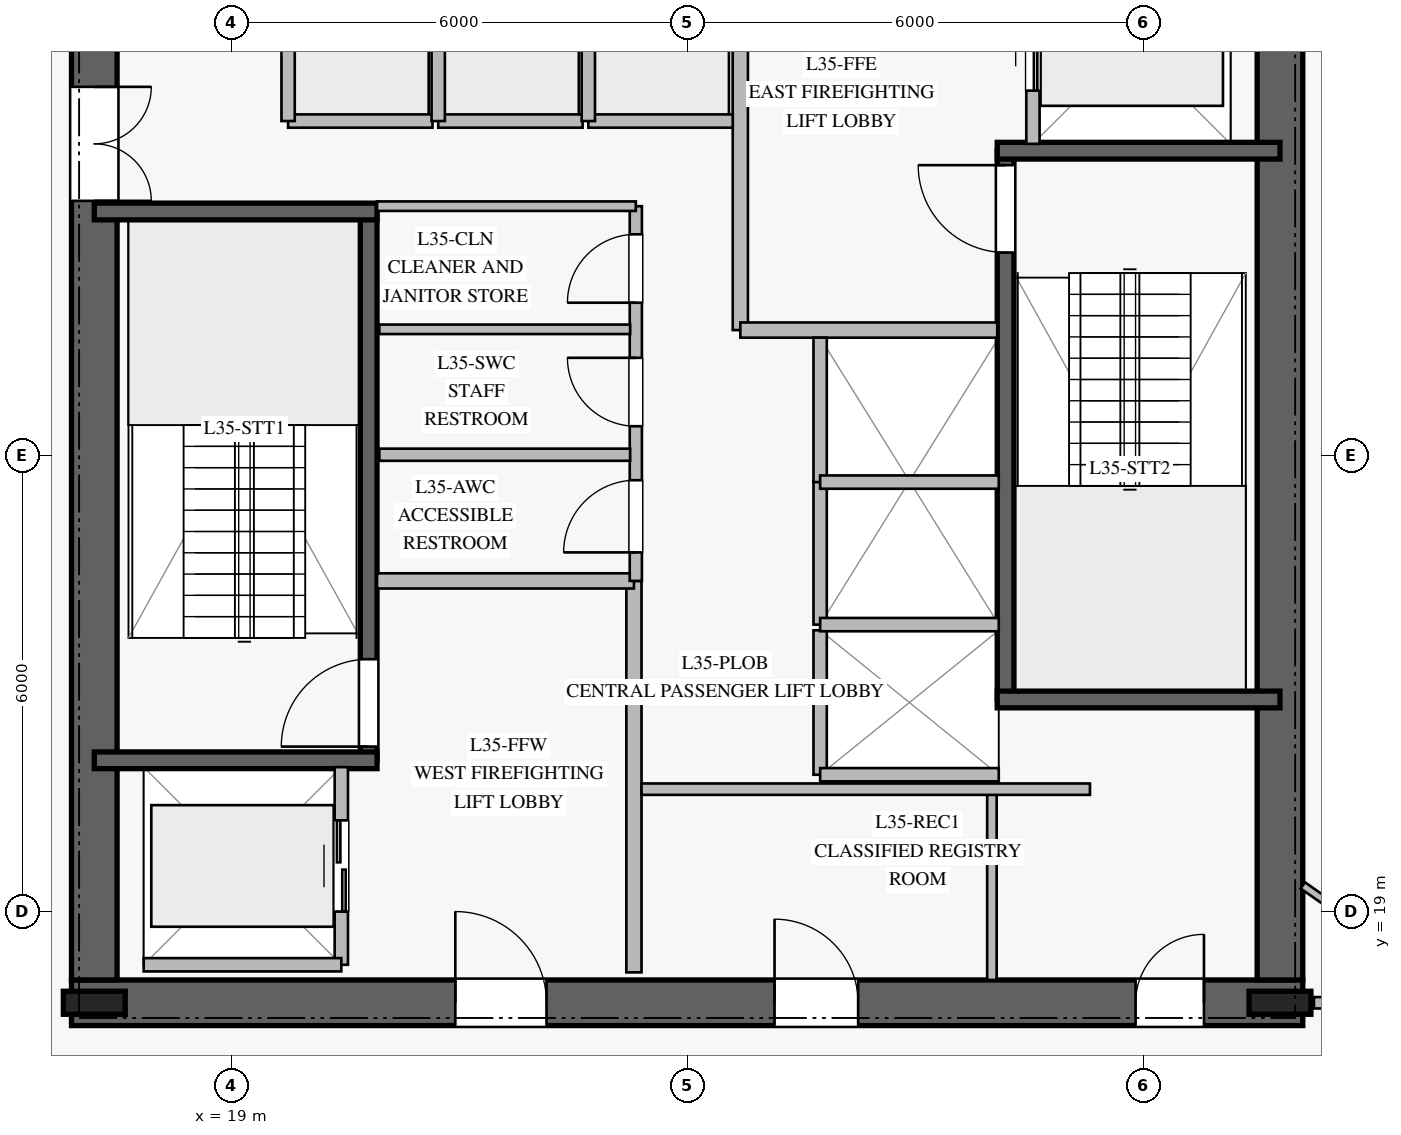
"""IFC4 building model, lengths in metres.
Left out: names, types, materials, properties, quantities, classifications, styles, units other than length and angle.
Written with IfcOpenShell. Run it as: python <this file> out.ifc"""

import sys

from ifc_helpers import new_model, si_unit, direction, frame, frame_2d, origin, origin_2d, place, context, subcontext, project, spatial, rectangle, i_section, extrude, element, fill, save


model = new_model("IFC4")
c1 = context("Model", 3, precision=1e-05, world=origin(), true_north=direction((0.0, 1.0)))
c2 = subcontext(c1, "Body", "Model", "MODEL_VIEW")
j1 = project(units=[si_unit("LENGTHUNIT", "METRE"), si_unit("PLANEANGLEUNIT", "RADIAN")], contexts=[c1])
p1 = place(None, origin())
s1 = spatial("IfcSite", under=j1, at=p1, CompositionType="ELEMENT")
p2 = place(p1, origin())
s2 = spatial("IfcBuilding", under=s1, at=p2, CompositionType="ELEMENT")
p3 = place(p2, frame((0.0, 0.0, 146.4)))
s3 = spatial("IfcBuildingStorey", under=s2, at=p3, CompositionType="ELEMENT", Elevation=146.4)
p4 = place(p3, frame((16.9, 17.8, 0.0), z_axis=(0.0, 0.0, 1.0), x_axis=(1.0, 0.0, 0.0)))
e1 = element("IfcWall", 1, at=p4, inside=s3, PredefinedType="SHEAR", context=c2, shape_type="SweptSolid", body=[
    extrude(rectangle(XDim=16.2, YDim=0.6, at=frame_2d((8.1, 0.0))), origin(), (0.0, 0.0, 1.0), 3.76),
])
p5 = place(p4, frame((5.05, 0.0, 0.0)))
e2 = element("IfcOpeningElement", 2, at=p5, cuts=e1, PredefinedType="OPENING", context=c2, shape_type="SweptSolid", body=[
    extrude(rectangle(XDim=1.2, YDim=2.25, at=frame_2d((0.6, 1.125))), frame((0.0, 0.31, 0.0), z_axis=(0.0, -1.0, 0.0), x_axis=(1.0, 0.0, 0.0)), (0.0, 0.0, 1.0), 0.62),
])
p6 = place(p4, frame((14.0, 0.0, 0.0)))
e3 = element("IfcOpeningElement", 3, at=p6, cuts=e1, PredefinedType="OPENING", context=c2, shape_type="SweptSolid", body=[
    extrude(rectangle(XDim=0.9, YDim=2.1, at=frame_2d((0.45, 1.05))), frame((0.0, 0.31, 0.0), z_axis=(0.0, -1.0, 0.0), x_axis=(1.0, 0.0, 0.0)), (0.0, 0.0, 1.0), 0.62),
])
p7 = place(p4, frame((9.25, 0.0, 0.0)))
e4 = element("IfcOpeningElement", 4, at=p7, cuts=e1, PredefinedType="OPENING", context=c2, shape_type="SweptSolid", body=[
    extrude(rectangle(XDim=1.1, YDim=2.2, at=frame_2d((0.55, 1.1))), frame((0.0, 0.31, 0.0), z_axis=(0.0, -1.0, 0.0), x_axis=(1.0, 0.0, 0.0)), (0.0, 0.0, 1.0), 0.62),
])
p8 = place(p3, frame((17.2, 31.9, 0.0), z_axis=(0.0, 0.0, 1.0), x_axis=(0.0, -1.0, 0.0)))
e5 = element("IfcWall", 5, at=p8, inside=s3, PredefinedType="SHEAR", context=c2, shape_type="SweptSolid", body=[
    extrude(rectangle(XDim=13.8, YDim=0.6, at=frame_2d((6.9, 0.0))), origin(), (0.0, 0.0, 1.0), 3.76),
])
p9 = place(p8, frame((2.05, 0.0, 0.0)))
e6 = element("IfcOpeningElement", 6, at=p9, cuts=e5, PredefinedType="OPENING", context=c2, shape_type="SweptSolid", body=[
    extrude(rectangle(XDim=1.5, YDim=2.2, at=frame_2d((0.75, 1.1))), frame((0.0, 0.31, 0.0), z_axis=(0.0, -1.0, 0.0), x_axis=(1.0, 0.0, 0.0)), (0.0, 0.0, 1.0), 0.62),
])
p10 = place(p3, frame((32.8, 18.1, 0.0), z_axis=(0.0, 0.0, 1.0), x_axis=(0.0, 1.0, 0.0)))
e7 = element("IfcWall", 7, at=p10, inside=s3, PredefinedType="SHEAR", context=c2, shape_type="SweptSolid", body=[
    extrude(rectangle(XDim=13.8, YDim=0.6, at=frame_2d((6.9, 0.0))), origin(), (0.0, 0.0, 1.0), 3.76),
])
for number, where, z_axis, x_axis in (
    (8, (17.2, 17.8, 0.0), (0.0, 0.0, 1.0), (1.0, 0.0, 0.0)),
    (9, (32.8, 17.8, 0.0), (0.0, 0.0, 1.0), (1.0, 0.0, 0.0)),
):
    element("IfcColumn", number, at=place(p3, frame(where, z_axis=z_axis, x_axis=x_axis)), inside=s3, PredefinedType="COLUMN", context=c2, shape_type="SweptSolid", body=[
        extrude(i_section(OverallWidth=0.303, OverallDepth=0.814, WebThickness=0.021, FlangeThickness=0.04, at=origin_2d()), origin(), (0.0, 0.0, 1.0), 4.0),
    ])
p11 = place(p3, frame((20.81, 20.99, 0.0), z_axis=(0.0, 0.0, 1.0), x_axis=(0.0, 1.0, 0.0)))
e10 = element("IfcWall", 10, at=p11, inside=s3, PredefinedType="SOLIDWALL", context=c2, shape_type="SweptSolid", body=[
    extrude(rectangle(XDim=7.22, YDim=0.22, at=frame_2d((3.61, 0.0))), origin(), (0.0, 0.0, 1.0), 3.76),
])
p12 = place(p11, frame((0.18, 0.0, 0.0)))
e11 = element("IfcOpeningElement", 11, at=p12, cuts=e10, PredefinedType="OPENING", context=c2, shape_type="SweptSolid", body=[
    extrude(rectangle(XDim=1.15, YDim=2.2, at=frame_2d((0.575, 1.1))), frame((0.0, 0.12, 0.0), z_axis=(0.0, -1.0, 0.0), x_axis=(1.0, 0.0, 0.0)), (0.0, 0.0, 1.0), 0.24),
])
for number, where, z_axis, x_axis in (
    (12, (17.2, 20.99, 0.0), (0.0, 0.0, 1.0), (1.0, 0.0, 0.0)),
    (13, (17.2, 28.21, 0.0), (0.0, 0.0, 1.0), (1.0, 0.0, 0.0)),
):
    element("IfcWall", number, at=place(p3, frame(where, z_axis=z_axis, x_axis=x_axis)), inside=s3, PredefinedType="SOLIDWALL", context=c2, shape_type="SweptSolid", body=[
        extrude(rectangle(XDim=3.72, YDim=0.22, at=frame_2d((1.86, 0.0))), origin(), (0.0, 0.0, 1.0), 3.76),
    ])
p13 = place(p3, frame((29.19, 21.79, 0.0), z_axis=(0.0, 0.0, 1.0), x_axis=(0.0, 1.0, 0.0)))
e14 = element("IfcWall", 14, at=p13, inside=s3, PredefinedType="SOLIDWALL", context=c2, shape_type="SweptSolid", body=[
    extrude(rectangle(XDim=7.22, YDim=0.22, at=frame_2d((3.61, 0.0))), origin(), (0.0, 0.0, 1.0), 3.76),
])
p14 = place(p13, frame((5.88, 0.0, 0.0)))
e15 = element("IfcOpeningElement", 15, at=p14, cuts=e14, PredefinedType="OPENING", context=c2, shape_type="SweptSolid", body=[
    extrude(rectangle(XDim=1.15, YDim=2.2, at=frame_2d((0.575, 1.1))), frame((0.0, 0.12, 0.0), z_axis=(0.0, -1.0, 0.0), x_axis=(1.0, 0.0, 0.0)), (0.0, 0.0, 1.0), 0.24),
])
for number, where, z_axis, x_axis in (
    (16, (29.08, 21.79, 0.0), (0.0, 0.0, 1.0), (1.0, 0.0, 0.0)),
    (17, (29.08, 29.01, 0.0), (0.0, 0.0, 1.0), (1.0, 0.0, 0.0)),
):
    element("IfcWall", number, at=place(p3, frame(where, z_axis=z_axis, x_axis=x_axis)), inside=s3, PredefinedType="SOLIDWALL", context=c2, shape_type="SweptSolid", body=[
        extrude(rectangle(XDim=3.72, YDim=0.22, at=frame_2d((1.86, 0.0))), origin(), (0.0, 0.0, 1.0), 3.76),
    ])
p15 = place(p3, frame((24.3, 18.2, 0.0), z_axis=(0.0, 0.0, 1.0), x_axis=(0.0, 1.0, 0.0)))
e18 = element("IfcWall", 18, at=p15, inside=s3, PredefinedType="PARTITIONING", context=c2, shape_type="SweptSolid", body=[
    extrude(rectangle(XDim=5.15, YDim=0.2, at=frame_2d((2.575, 0.0))), origin(), (0.0, 0.0, 1.0), 3.76),
])
p16 = place(p3, frame((20.92, 23.35, 0.0), z_axis=(0.0, 0.0, 1.0), x_axis=(1.0, 0.0, 0.0)))
e19 = element("IfcWall", 19, at=p16, inside=s3, PredefinedType="PARTITIONING", context=c2, shape_type="SweptSolid", body=[
    extrude(rectangle(XDim=3.38, YDim=0.2, at=frame_2d((1.69, 0.0))), origin(), (0.0, 0.0, 1.0), 3.76),
])
p17 = place(p3, frame((25.7, 26.65, 0.0), z_axis=(0.0, 0.0, 1.0), x_axis=(0.0, 1.0, 0.0)))
e20 = element("IfcWall", 20, at=p17, inside=s3, PredefinedType="PARTITIONING", context=c2, shape_type="SweptSolid", body=[
    extrude(rectangle(XDim=5.15, YDim=0.2, at=frame_2d((2.575, 0.0))), origin(), (0.0, 0.0, 1.0), 3.76),
])
p18 = place(p3, frame((25.7, 26.65, 0.0), z_axis=(0.0, 0.0, 1.0), x_axis=(1.0, 0.0, 0.0)))
e21 = element("IfcWall", 21, at=p18, inside=s3, PredefinedType="PARTITIONING", context=c2, shape_type="SweptSolid", body=[
    extrude(rectangle(XDim=3.38, YDim=0.2, at=frame_2d((1.69, 0.0))), origin(), (0.0, 0.0, 1.0), 3.76),
])
p19 = place(p3, frame((24.325, 23.35, 0.0), z_axis=(0.0, 0.0, 1.0), x_axis=(0.0, 1.0, 0.0)))
e22 = element("IfcWall", 22, at=p19, inside=s3, PredefinedType="PLUMBINGWALL", context=c2, shape_type="SweptSolid", body=[
    extrude(rectangle(XDim=4.93, YDim=0.16, at=frame_2d((2.465, 0.0))), origin(), (0.0, 0.0, 1.0), 3.76),
])
p20 = place(p19, frame((0.375, 0.0, 0.0)))
e23 = element("IfcOpeningElement", 23, at=p20, cuts=e22, PredefinedType="OPENING", context=c2, shape_type="SweptSolid", body=[
    extrude(rectangle(XDim=0.95, YDim=2.1, at=frame_2d((0.475, 1.05))), frame((0.0, 0.09, 0.0), z_axis=(0.0, -1.0, 0.0), x_axis=(1.0, 0.0, 0.0)), (0.0, 0.0, 1.0), 0.18),
])
p21 = place(p19, frame((2.035, 0.0, 0.0)))
e24 = element("IfcOpeningElement", 24, at=p21, cuts=e22, PredefinedType="OPENING", context=c2, shape_type="SweptSolid", body=[
    extrude(rectangle(XDim=0.9, YDim=2.1, at=frame_2d((0.45, 1.05))), frame((0.0, 0.09, 0.0), z_axis=(0.0, -1.0, 0.0), x_axis=(1.0, 0.0, 0.0)), (0.0, 0.0, 1.0), 0.18),
])
p22 = place(p19, frame((3.66, 0.0, 0.0)))
e25 = element("IfcOpeningElement", 25, at=p22, cuts=e22, PredefinedType="OPENING", context=c2, shape_type="SweptSolid", body=[
    extrude(rectangle(XDim=0.9, YDim=2.1, at=frame_2d((0.45, 1.05))), frame((0.0, 0.09, 0.0), z_axis=(0.0, -1.0, 0.0), x_axis=(1.0, 0.0, 0.0)), (0.0, 0.0, 1.0), 0.18),
])
p23 = place(p3, frame((20.92, 28.28, 0.0), z_axis=(0.0, 0.0, 1.0), x_axis=(1.0, 0.0, 0.0)))
e26 = element("IfcWall", 26, at=p23, inside=s3, PredefinedType="PARTITIONING", context=c2, shape_type="SweptSolid", body=[
    extrude(rectangle(XDim=3.405, YDim=0.125, at=frame_2d((1.703, 0.0))), origin(), (0.0, 0.0, 1.0), 3.76),
])
p24 = place(p3, frame((29.01, 18.1, 0.0), z_axis=(0.0, 0.0, 1.0), x_axis=(0.0, 1.0, 0.0)))
e27 = element("IfcWall", 27, at=p24, inside=s3, PredefinedType="PARTITIONING", context=c2, shape_type="SweptSolid", body=[
    extrude(rectangle(XDim=2.45, YDim=0.125, at=frame_2d((1.225, 0.0))), origin(), (0.0, 0.0, 1.0), 3.76),
])
p25 = place(p3, frame((20.95, 25.01, 0.0), z_axis=(0.0, 0.0, 1.0), x_axis=(1.0, 0.0, 0.0)))
e28 = element("IfcWall", 28, at=p25, inside=s3, PredefinedType="PLUMBINGWALL", context=c2, shape_type="SweptSolid", body=[
    extrude(rectangle(XDim=3.3, YDim=0.16, at=frame_2d((1.65, 0.0))), origin(), (0.0, 0.0, 1.0), 3.76),
])
p26 = place(p3, frame((20.95, 26.66, 0.0), z_axis=(0.0, 0.0, 1.0), x_axis=(1.0, 0.0, 0.0)))
e29 = element("IfcWall", 29, at=p26, inside=s3, PredefinedType="PARTITIONING", context=c2, shape_type="SweptSolid", body=[
    extrude(rectangle(XDim=3.3, YDim=0.125, at=frame_2d((1.65, 0.0))), origin(), (0.0, 0.0, 1.0), 3.76),
])
p27 = place(p3, frame((24.4, 20.61, 0.0), z_axis=(0.0, 0.0, 1.0), x_axis=(1.0, 0.0, 0.0)))
e30 = element("IfcWall", 30, at=p27, inside=s3, PredefinedType="PARTITIONING", context=c2, shape_type="SweptSolid", body=[
    extrude(rectangle(XDim=5.9, YDim=0.15, at=frame_2d((2.95, 0.0))), origin(), (0.0, 0.0, 1.0), 3.76),
])
p28 = place(p3, frame((19.75, 29.4, 0.0), z_axis=(0.0, 0.0, 1.0), x_axis=(1.0, 0.0, 0.0)))
e31 = element("IfcWall", 31, at=p28, inside=s3, PredefinedType="PARTITIONING", context=c2, shape_type="SweptSolid", body=[
    extrude(rectangle(XDim=1.9, YDim=0.175, at=frame_2d((0.95, 0.0))), origin(), (0.0, 0.0, 1.0), 3.76),
])
p29 = place(p3, frame((19.75, 29.4, 0.0), z_axis=(0.0, 0.0, 1.0), x_axis=(0.0, 1.0, 0.0)))
e32 = element("IfcWall", 32, at=p29, inside=s3, PredefinedType="PARTITIONING", context=c2, shape_type="SweptSolid", body=[
    extrude(rectangle(XDim=2.35, YDim=0.175, at=frame_2d((1.175, 0.0))), origin(), (0.0, 0.0, 1.0), 3.76),
])
p30 = place(p3, frame((21.725, 29.4, 0.0), z_axis=(0.0, 0.0, 1.0), x_axis=(1.0, 0.0, 0.0)))
e33 = element("IfcWall", 33, at=p30, inside=s3, PredefinedType="PARTITIONING", context=c2, shape_type="SweptSolid", body=[
    extrude(rectangle(XDim=1.9, YDim=0.175, at=frame_2d((0.95, 0.0))), origin(), (0.0, 0.0, 1.0), 3.76),
])
p31 = place(p3, frame((21.725, 29.4, 0.0), z_axis=(0.0, 0.0, 1.0), x_axis=(0.0, 1.0, 0.0)))
e34 = element("IfcWall", 34, at=p31, inside=s3, PredefinedType="PARTITIONING", context=c2, shape_type="SweptSolid", body=[
    extrude(rectangle(XDim=2.35, YDim=0.175, at=frame_2d((1.175, 0.0))), origin(), (0.0, 0.0, 1.0), 3.76),
])
p32 = place(p3, frame((23.7, 29.4, 0.0), z_axis=(0.0, 0.0, 1.0), x_axis=(1.0, 0.0, 0.0)))
e35 = element("IfcWall", 35, at=p32, inside=s3, PredefinedType="PARTITIONING", context=c2, shape_type="SweptSolid", body=[
    extrude(rectangle(XDim=1.9, YDim=0.175, at=frame_2d((0.95, 0.0))), origin(), (0.0, 0.0, 1.0), 3.76),
])
p33 = place(p3, frame((23.7, 29.4, 0.0), z_axis=(0.0, 0.0, 1.0), x_axis=(0.0, 1.0, 0.0)))
e36 = element("IfcWall", 36, at=p33, inside=s3, PredefinedType="PARTITIONING", context=c2, shape_type="SweptSolid", body=[
    extrude(rectangle(XDim=2.35, YDim=0.175, at=frame_2d((1.175, 0.0))), origin(), (0.0, 0.0, 1.0), 3.76),
])
p34 = place(p3, frame((26.75, 20.8, 0.0), z_axis=(0.0, 0.0, 1.0), x_axis=(0.0, 1.0, 0.0)))
e37 = element("IfcWall", 37, at=p34, inside=s3, PredefinedType="PARTITIONING", context=c2, shape_type="SweptSolid", body=[
    extrude(rectangle(XDim=1.9, YDim=0.175, at=frame_2d((0.95, 0.0))), origin(), (0.0, 0.0, 1.0), 3.76),
])
p35 = place(p3, frame((26.75, 20.8, 0.0), z_axis=(0.0, 0.0, 1.0), x_axis=(1.0, 0.0, 0.0)))
e38 = element("IfcWall", 38, at=p35, inside=s3, PredefinedType="PARTITIONING", context=c2, shape_type="SweptSolid", body=[
    extrude(rectangle(XDim=2.35, YDim=0.175, at=frame_2d((1.175, 0.0))), origin(), (0.0, 0.0, 1.0), 3.76),
])
p36 = place(p3, frame((26.75, 22.775, 0.0), z_axis=(0.0, 0.0, 1.0), x_axis=(0.0, 1.0, 0.0)))
e39 = element("IfcWall", 39, at=p36, inside=s3, PredefinedType="PARTITIONING", context=c2, shape_type="SweptSolid", body=[
    extrude(rectangle(XDim=1.9, YDim=0.175, at=frame_2d((0.95, 0.0))), origin(), (0.0, 0.0, 1.0), 3.76),
])
p37 = place(p3, frame((26.75, 22.775, 0.0), z_axis=(0.0, 0.0, 1.0), x_axis=(1.0, 0.0, 0.0)))
e40 = element("IfcWall", 40, at=p37, inside=s3, PredefinedType="PARTITIONING", context=c2, shape_type="SweptSolid", body=[
    extrude(rectangle(XDim=2.35, YDim=0.175, at=frame_2d((1.175, 0.0))), origin(), (0.0, 0.0, 1.0), 3.76),
])
p38 = place(p3, frame((26.75, 24.65, 0.0), z_axis=(0.0, 0.0, 1.0), x_axis=(0.0, 1.0, 0.0)))
e41 = element("IfcWall", 41, at=p38, inside=s3, PredefinedType="PARTITIONING", context=c2, shape_type="SweptSolid", body=[
    extrude(rectangle(XDim=1.9, YDim=0.175, at=frame_2d((0.95, 0.0))), origin(), (0.0, 0.0, 1.0), 3.76),
])
p39 = place(p3, frame((26.75, 24.65, 0.0), z_axis=(0.0, 0.0, 1.0), x_axis=(1.0, 0.0, 0.0)))
e42 = element("IfcWall", 42, at=p39, inside=s3, PredefinedType="PARTITIONING", context=c2, shape_type="SweptSolid", body=[
    extrude(rectangle(XDim=2.35, YDim=0.175, at=frame_2d((1.175, 0.0))), origin(), (0.0, 0.0, 1.0), 3.76),
])
p40 = place(p3, frame((20.45, 18.3, 0.0), z_axis=(0.0, 0.0, 1.0), x_axis=(0.0, 1.0, 0.0)))
e43 = element("IfcWall", 43, at=p40, inside=s3, PredefinedType="PARTITIONING", context=c2, shape_type="SweptSolid", body=[
    extrude(rectangle(XDim=2.6, YDim=0.175, at=frame_2d((1.3, 0.0))), origin(), (0.0, 0.0, 1.0), 3.76),
])
p41 = place(p40, frame((0.7, 0.0, 0.0)))
e44 = element("IfcOpeningElement", 44, at=p41, cuts=e43, PredefinedType="OPENING", context=c2, shape_type="SweptSolid", body=[
    extrude(rectangle(XDim=1.2, YDim=2.2, at=frame_2d((0.6, 1.1))), frame((0.0, 0.098, 0.0), z_axis=(0.0, -1.0, 0.0), x_axis=(1.0, 0.0, 0.0)), (0.0, 0.0, 1.0), 0.195),
])
p42 = place(p3, frame((17.85, 18.3, 0.0), z_axis=(0.0, 0.0, 1.0), x_axis=(1.0, 0.0, 0.0)))
e45 = element("IfcWall", 45, at=p42, inside=s3, PredefinedType="PARTITIONING", context=c2, shape_type="SweptSolid", body=[
    extrude(rectangle(XDim=2.6, YDim=0.175, at=frame_2d((1.3, 0.0))), origin(), (0.0, 0.0, 1.0), 3.76),
])
p43 = place(p3, frame((29.55, 29.1, 0.0), z_axis=(0.0, 0.0, 1.0), x_axis=(0.0, 1.0, 0.0)))
e46 = element("IfcWall", 46, at=p43, inside=s3, PredefinedType="PARTITIONING", context=c2, shape_type="SweptSolid", body=[
    extrude(rectangle(XDim=2.6, YDim=0.175, at=frame_2d((1.3, 0.0))), origin(), (0.0, 0.0, 1.0), 3.76),
])
p44 = place(p43, frame((0.7, 0.0, 0.0)))
e47 = element("IfcOpeningElement", 47, at=p44, cuts=e46, PredefinedType="OPENING", context=c2, shape_type="SweptSolid", body=[
    extrude(rectangle(XDim=1.2, YDim=2.2, at=frame_2d((0.6, 1.1))), frame((0.0, 0.098, 0.0), z_axis=(0.0, -1.0, 0.0), x_axis=(1.0, 0.0, 0.0)), (0.0, 0.0, 1.0), 0.195),
])
p45 = place(p3, frame((33.247, 17.8, 0.0), z_axis=(0.0, 0.0, 1.0), x_axis=(1.0, 0.0, 0.0)))
e48 = element("IfcWall", 48, at=p45, inside=s3, PredefinedType="PARTITIONING", context=c2, shape_type="SweptSolid", body=[
    extrude(rectangle(XDim=7.953, YDim=0.15, at=frame_2d((3.977, 0.0))), origin(), (0.0, 0.0, 1.0), 3.21),
])
p46 = place(p3, frame((33.1, 19.344, 0.0), z_axis=(0.0, 0.0, 1.0), x_axis=(0.819877899319, -0.572538409374, 0.0)))
e49 = element("IfcWall", 49, at=p46, inside=s3, PredefinedType="MOVABLE", context=c2, shape_type="SweptSolid", body=[
    extrude(rectangle(XDim=2.697, YDim=0.1, at=frame_2d((1.348, 0.0))), origin(), (0.0, 0.0, 1.0), 3.21),
])
p47 = place(p12, origin())
e50 = element("IfcDoor", 50, at=p47, inside=s3, OperationType="SINGLE_SWING_LEFT", PredefinedType="DOOR", context=c2, shape_type="SweptSolid", body=[
    extrude(rectangle(XDim=1.15, YDim=2.2, at=frame_2d((0.575, 1.1))), frame((0.0, 0.025, 0.0), z_axis=(0.0, -1.0, 0.0), x_axis=(1.0, 0.0, 0.0)), (0.0, 0.0, 1.0), 0.05),
])
fill(e11, e50)
p48 = place(p14, origin())
e51 = element("IfcDoor", 51, at=p48, inside=s3, OperationType="SINGLE_SWING_RIGHT", PredefinedType="DOOR", context=c2, shape_type="SweptSolid", body=[
    extrude(rectangle(XDim=1.15, YDim=2.2, at=frame_2d((0.575, 1.1))), frame((0.0, 0.025, 0.0), z_axis=(0.0, -1.0, 0.0), x_axis=(1.0, 0.0, 0.0)), (0.0, 0.0, 1.0), 0.05),
])
fill(e15, e51)
p49 = place(p5, origin())
e52 = element("IfcDoor", 52, at=p49, inside=s3, OperationType="SINGLE_SWING_LEFT", PredefinedType="DOOR", context=c2, shape_type="SweptSolid", body=[
    extrude(rectangle(XDim=1.2, YDim=2.25, at=frame_2d((0.6, 1.125))), frame((0.0, 0.025, 0.0), z_axis=(0.0, -1.0, 0.0), x_axis=(1.0, 0.0, 0.0)), (0.0, 0.0, 1.0), 0.05),
])
fill(e2, e52)
p50 = place(p9, origin())
e53 = element("IfcDoor", 53, at=p50, inside=s3, OperationType="DOUBLE_DOOR_SINGLE_SWING", PredefinedType="DOOR", context=c2, shape_type="SweptSolid", body=[
    extrude(rectangle(XDim=1.5, YDim=2.2, at=frame_2d((0.75, 1.1))), frame((0.0, 0.025, 0.0), z_axis=(0.0, -1.0, 0.0), x_axis=(1.0, 0.0, 0.0)), (0.0, 0.0, 1.0), 0.05),
])
fill(e6, e53)
p51 = place(p20, origin())
e54 = element("IfcDoor", 54, at=p51, inside=s3, OperationType="SINGLE_SWING_LEFT", PredefinedType="DOOR", context=c2, shape_type="SweptSolid", body=[
    extrude(rectangle(XDim=0.95, YDim=2.1, at=frame_2d((0.475, 1.05))), frame((0.0, 0.025, 0.0), z_axis=(0.0, -1.0, 0.0), x_axis=(1.0, 0.0, 0.0)), (0.0, 0.0, 1.0), 0.05),
])
fill(e23, e54)
p52 = place(p21, origin())
e55 = element("IfcDoor", 55, at=p52, inside=s3, OperationType="SINGLE_SWING_RIGHT", PredefinedType="DOOR", context=c2, shape_type="SweptSolid", body=[
    extrude(rectangle(XDim=0.9, YDim=2.1, at=frame_2d((0.45, 1.05))), frame((0.0, 0.025, 0.0), z_axis=(0.0, -1.0, 0.0), x_axis=(1.0, 0.0, 0.0)), (0.0, 0.0, 1.0), 0.05),
])
fill(e24, e55)
p53 = place(p22, origin())
e56 = element("IfcDoor", 56, at=p53, inside=s3, OperationType="SINGLE_SWING_LEFT", PredefinedType="DOOR", context=c2, shape_type="SweptSolid", body=[
    extrude(rectangle(XDim=0.9, YDim=2.1, at=frame_2d((0.45, 1.05))), frame((0.0, 0.025, 0.0), z_axis=(0.0, -1.0, 0.0), x_axis=(1.0, 0.0, 0.0)), (0.0, 0.0, 1.0), 0.05),
])
fill(e25, e56)
p54 = place(p6, origin())
e57 = element("IfcDoor", 57, at=p54, inside=s3, OperationType="SINGLE_SWING_RIGHT", PredefinedType="DOOR", context=c2, shape_type="SweptSolid", body=[
    extrude(rectangle(XDim=0.9, YDim=2.1, at=frame_2d((0.45, 1.05))), frame((0.0, 0.025, 0.0), z_axis=(0.0, -1.0, 0.0), x_axis=(1.0, 0.0, 0.0)), (0.0, 0.0, 1.0), 0.05),
])
fill(e3, e57)
p55 = place(p7, origin())
e58 = element("IfcDoor", 58, at=p55, inside=s3, OperationType="SINGLE_SWING_LEFT", PredefinedType="DOOR", context=c2, shape_type="SweptSolid", body=[
    extrude(rectangle(XDim=1.1, YDim=2.2, at=frame_2d((0.55, 1.1))), frame((0.0, 0.025, 0.0), z_axis=(0.0, -1.0, 0.0), x_axis=(1.0, 0.0, 0.0)), (0.0, 0.0, 1.0), 0.05),
])
fill(e4, e58)
p56 = place(p41, origin())
e59 = element("IfcDoor", 59, at=p56, inside=s3, OperationType="DOUBLE_DOOR_SLIDING", PredefinedType="DOOR", context=c2, shape_type="SweptSolid", body=[
    extrude(rectangle(XDim=1.2, YDim=2.2, at=frame_2d((0.6, 1.1))), frame((0.0, 0.025, 0.0), z_axis=(0.0, -1.0, 0.0), x_axis=(1.0, 0.0, 0.0)), (0.0, 0.0, 1.0), 0.05),
])
fill(e44, e59)
p57 = place(p44, origin())
e60 = element("IfcDoor", 60, at=p57, inside=s3, OperationType="DOUBLE_DOOR_SLIDING", PredefinedType="DOOR", context=c2, shape_type="SweptSolid", body=[
    extrude(rectangle(XDim=1.2, YDim=2.2, at=frame_2d((0.6, 1.1))), frame((0.0, 0.025, 0.0), z_axis=(0.0, -1.0, 0.0), x_axis=(1.0, 0.0, 0.0)), (0.0, 0.0, 1.0), 0.05),
])
fill(e47, e60)
save(model, sys.argv[1])
